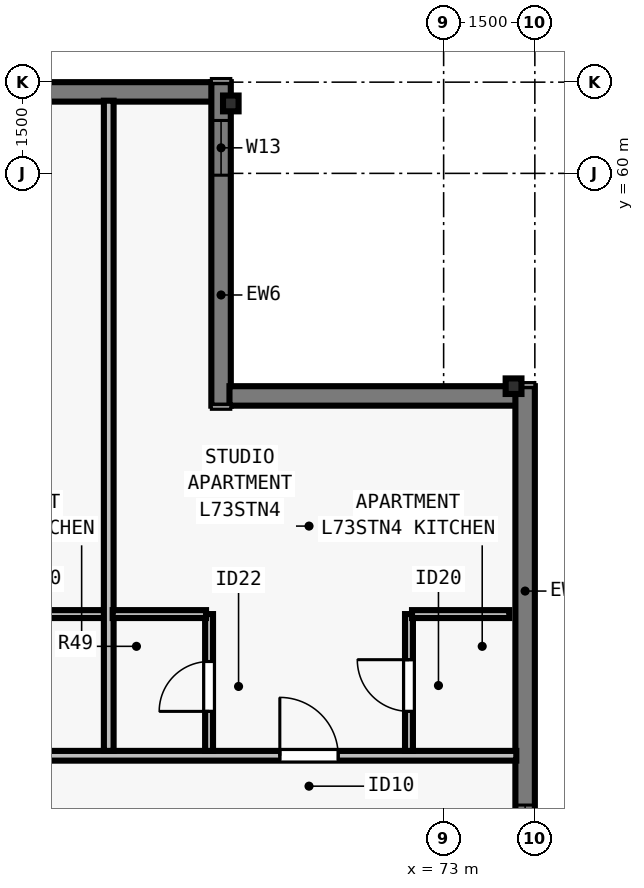
"""IFC4 building model, lengths in metres.
Left out: names, types, materials, properties, quantities, classifications, styles, units other than length and angle.
Written with IfcOpenShell. Run it as: python <this file> out.ifc"""

import sys

from ifc_helpers import new_model, si_unit, direction, frame, frame_2d, origin, origin_2d, place, context, subcontext, project, spatial, rectangle, i_section, extrude, element, fill, save


model = new_model("IFC4")
c1 = context("Model", 3, precision=1e-05, world=origin(), true_north=direction((0.0, 1.0)))
c2 = subcontext(c1, "Body", "Model", "MODEL_VIEW")
j1 = project(units=[si_unit("LENGTHUNIT", "METRE"), si_unit("PLANEANGLEUNIT", "RADIAN")], contexts=[c1])
p1 = place(None, origin())
s1 = spatial("IfcSite", under=j1, at=p1, CompositionType="ELEMENT")
p2 = place(p1, origin())
s2 = spatial("IfcBuilding", under=s1, at=p2, CompositionType="ELEMENT")
p3 = place(p2, frame((0.0, 0.0, 265.5)))
s3 = spatial("IfcBuildingStorey", under=s2, at=p3, CompositionType="ELEMENT", Elevation=265.5)
for number, where, z_axis, x_axis in (
    (1, (74.15, 56.5, 0.0), (0.0, 0.0, 1.0), (0.0, 1.0, 0.0)),
    (2, (69.5, 61.15, 0.0), (0.0, 0.0, 1.0), (1.0, 0.0, 0.0)),
):
    element("IfcColumn", number, at=place(p3, frame(where, z_axis=z_axis, x_axis=x_axis)), inside=s3, PredefinedType="COLUMN", context=c2, shape_type="SweptSolid", body=[
        extrude(i_section(OverallWidth=0.256, OverallDepth=0.26, WebThickness=0.01, FlangeThickness=0.017, FilletRadius=0.013, at=origin_2d()), origin(), (0.0, 0.0, 1.0), 3.5),
    ])
p4 = place(p3, frame((34.5, 61.34, 0.0), z_axis=(0.0, 0.0, 1.0), x_axis=(1.0, 0.0, 0.0)))
e3 = element("IfcWall", 3, at=p4, inside=s3, PredefinedType="SOLIDWALL", context=c2, shape_type="SweptSolid", body=[
    extrude(rectangle(XDim=34.702, YDim=0.32, at=frame_2d((17.351, 0.0))), origin(), (0.0, 0.0, 1.0), 3.29),
])
p5 = place(p4, frame((4.613, 0.0, 0.8)))
e4 = element("IfcOpeningElement", 4, at=p5, cuts=e3, PredefinedType="OPENING", context=c2, shape_type="SweptSolid", body=[
    extrude(rectangle(XDim=1.85, YDim=1.678, at=frame_2d((0.925, 0.839))), frame((0.0, 0.17, 0.0), z_axis=(0.0, -1.0, 0.0), x_axis=(1.0, 0.0, 0.0)), (0.0, 0.0, 1.0), 0.34),
])
p6 = place(p4, frame((8.138, 0.0, 0.8)))
e5 = element("IfcOpeningElement", 5, at=p6, cuts=e3, PredefinedType="OPENING", context=c2, shape_type="SweptSolid", body=[
    extrude(rectangle(XDim=1.55, YDim=1.678, at=frame_2d((0.775, 0.839))), frame((0.0, 0.17, 0.0), z_axis=(0.0, -1.0, 0.0), x_axis=(1.0, 0.0, 0.0)), (0.0, 0.0, 1.0), 0.34),
])
p7 = place(p4, frame((14.888, 0.0, 0.8)))
e6 = element("IfcOpeningElement", 6, at=p7, cuts=e3, PredefinedType="OPENING", context=c2, shape_type="SweptSolid", body=[
    extrude(rectangle(XDim=1.55, YDim=1.678, at=frame_2d((0.775, 0.839))), frame((0.0, 0.17, 0.0), z_axis=(0.0, -1.0, 0.0), x_axis=(1.0, 0.0, 0.0)), (0.0, 0.0, 1.0), 0.34),
])
p8 = place(p4, frame((19.364, 0.0, 0.8)))
e7 = element("IfcOpeningElement", 7, at=p8, cuts=e3, PredefinedType="OPENING", context=c2, shape_type="SweptSolid", body=[
    extrude(rectangle(XDim=1.85, YDim=1.678, at=frame_2d((0.925, 0.839))), frame((0.0, 0.17, 0.0), z_axis=(0.0, -1.0, 0.0), x_axis=(1.0, 0.0, 0.0)), (0.0, 0.0, 1.0), 0.34),
])
p9 = place(p4, frame((25.314, 0.0, 0.8)))
e8 = element("IfcOpeningElement", 8, at=p9, cuts=e3, PredefinedType="OPENING", context=c2, shape_type="SweptSolid", body=[
    extrude(rectangle(XDim=1.85, YDim=1.678, at=frame_2d((0.925, 0.839))), frame((0.0, 0.17, 0.0), z_axis=(0.0, -1.0, 0.0), x_axis=(1.0, 0.0, 0.0)), (0.0, 0.0, 1.0), 0.34),
])
p10 = place(p4, frame((28.389, 0.0, 0.8)))
e9 = element("IfcOpeningElement", 9, at=p10, cuts=e3, PredefinedType="OPENING", context=c2, shape_type="SweptSolid", body=[
    extrude(rectangle(XDim=1.55, YDim=1.678, at=frame_2d((0.775, 0.839))), frame((0.0, 0.17, 0.0), z_axis=(0.0, -1.0, 0.0), x_axis=(1.0, 0.0, 0.0)), (0.0, 0.0, 1.0), 0.34),
])
p11 = place(p3, frame((69.34, 61.5, 0.0), z_axis=(0.0, 0.0, 1.0), x_axis=(0.0, -1.0, 0.0)))
e10 = element("IfcWall", 10, at=p11, inside=s3, PredefinedType="SOLIDWALL", context=c2, shape_type="SweptSolid", body=[
    extrude(rectangle(XDim=5.32, YDim=0.32, at=frame_2d((2.66, 0.0))), origin(), (0.0, 0.0, 1.0), 3.29),
])
p12 = place(p11, frame((0.63, 0.0, 0.8)))
e11 = element("IfcOpeningElement", 11, at=p12, cuts=e10, PredefinedType="OPENING", context=c2, shape_type="SweptSolid", body=[
    extrude(rectangle(XDim=0.9, YDim=1.678, at=frame_2d((0.45, 0.839))), frame((0.0, 0.17, 0.0), z_axis=(0.0, -1.0, 0.0), x_axis=(1.0, 0.0, 0.0)), (0.0, 0.0, 1.0), 0.34),
])
p13 = place(p3, frame((69.478, 56.34, 0.0), z_axis=(0.0, 0.0, 1.0), x_axis=(1.0, 0.0, 0.0)))
e12 = element("IfcWall", 12, at=p13, inside=s3, PredefinedType="SOLIDWALL", context=c2, shape_type="SweptSolid", body=[
    extrude(rectangle(XDim=4.724, YDim=0.32, at=frame_2d((2.362, 0.0))), origin(), (0.0, 0.0, 1.0), 3.29),
])
p14 = place(p3, frame((74.34, 56.5, 0.0), z_axis=(0.0, 0.0, 1.0), x_axis=(0.0, -1.0, 0.0)))
e13 = element("IfcWall", 13, at=p14, inside=s3, PredefinedType="SOLIDWALL", context=c2, shape_type="SweptSolid", body=[
    extrude(rectangle(XDim=34.702, YDim=0.32, at=frame_2d((17.351, 0.0))), origin(), (0.0, 0.0, 1.0), 3.29),
])
p15 = place(p14, frame((6.888, 0.0, 0.8)))
e14 = element("IfcOpeningElement", 14, at=p15, cuts=e13, PredefinedType="OPENING", context=c2, shape_type="SweptSolid", body=[
    extrude(rectangle(XDim=1.55, YDim=1.678, at=frame_2d((0.775, 0.839))), frame((0.0, 0.17, 0.0), z_axis=(0.0, -1.0, 0.0), x_axis=(1.0, 0.0, 0.0)), (0.0, 0.0, 1.0), 0.34),
])
p16 = place(p14, frame((10.113, 0.0, 0.8)))
e15 = element("IfcOpeningElement", 15, at=p16, cuts=e13, PredefinedType="OPENING", context=c2, shape_type="SweptSolid", body=[
    extrude(rectangle(XDim=1.85, YDim=1.678, at=frame_2d((0.925, 0.839))), frame((0.0, 0.17, 0.0), z_axis=(0.0, -1.0, 0.0), x_axis=(1.0, 0.0, 0.0)), (0.0, 0.0, 1.0), 0.34),
])
p17 = place(p14, frame((14.038, 0.0, 0.8)))
e16 = element("IfcOpeningElement", 16, at=p17, cuts=e13, PredefinedType="OPENING", context=c2, shape_type="SweptSolid", body=[
    extrude(rectangle(XDim=1.55, YDim=1.678, at=frame_2d((0.775, 0.839))), frame((0.0, 0.17, 0.0), z_axis=(0.0, -1.0, 0.0), x_axis=(1.0, 0.0, 0.0)), (0.0, 0.0, 1.0), 0.34),
])
p18 = place(p14, frame((18.114, 0.0, 0.8)))
e17 = element("IfcOpeningElement", 17, at=p18, cuts=e13, PredefinedType="OPENING", context=c2, shape_type="SweptSolid", body=[
    extrude(rectangle(XDim=1.85, YDim=1.678, at=frame_2d((0.925, 0.839))), frame((0.0, 0.17, 0.0), z_axis=(0.0, -1.0, 0.0), x_axis=(1.0, 0.0, 0.0)), (0.0, 0.0, 1.0), 0.34),
])
p19 = place(p14, frame((23.614, 0.0, 0.8)))
e18 = element("IfcOpeningElement", 18, at=p19, cuts=e13, PredefinedType="OPENING", context=c2, shape_type="SweptSolid", body=[
    extrude(rectangle(XDim=1.85, YDim=1.678, at=frame_2d((0.925, 0.839))), frame((0.0, 0.17, 0.0), z_axis=(0.0, -1.0, 0.0), x_axis=(1.0, 0.0, 0.0)), (0.0, 0.0, 1.0), 0.34),
])
p20 = place(p14, frame((29.24, 0.0, 0.8)))
e19 = element("IfcOpeningElement", 19, at=p20, cuts=e13, PredefinedType="OPENING", context=c2, shape_type="SweptSolid", body=[
    extrude(rectangle(XDim=1.55, YDim=1.678, at=frame_2d((0.775, 0.839))), frame((0.0, 0.17, 0.0), z_axis=(0.0, -1.0, 0.0), x_axis=(1.0, 0.0, 0.0)), (0.0, 0.0, 1.0), 0.34),
])
p21 = place(p3, frame((29.805, 50.423, 0.0), z_axis=(0.0, 0.0, 1.0), x_axis=(1.0, 0.0, 0.0)))
e20 = element("IfcWall", 20, at=p21, inside=s3, PredefinedType="PARTITIONING", context=c2, shape_type="SweptSolid", body=[
    extrude(rectangle(XDim=44.39, YDim=0.16, at=frame_2d((22.195, 0.0))), origin(), (0.0, 0.0, 1.0), 2.958),
])
p22 = place(p21, frame((5.465, 0.0, 0.0)))
e21 = element("IfcOpeningElement", 21, at=p22, cuts=e20, PredefinedType="OPENING", context=c2, shape_type="SweptSolid", body=[
    extrude(rectangle(XDim=0.96, YDim=2.12, at=frame_2d((0.48, 1.06))), frame((0.0, 0.09, 0.0), z_axis=(0.0, -1.0, 0.0), x_axis=(1.0, 0.0, 0.0)), (0.0, 0.0, 1.0), 0.18),
])
p23 = place(p21, frame((19.179, 0.0, 0.0)))
e22 = element("IfcOpeningElement", 22, at=p23, cuts=e20, PredefinedType="OPENING", context=c2, shape_type="SweptSolid", body=[
    extrude(rectangle(XDim=0.96, YDim=2.18, at=frame_2d((0.48, 1.09))), frame((0.0, 0.09, 0.0), z_axis=(0.0, -1.0, 0.0), x_axis=(1.0, 0.0, 0.0)), (0.0, 0.0, 1.0), 0.18),
])
p24 = place(p21, frame((26.106, 0.0, 0.0)))
e23 = element("IfcOpeningElement", 23, at=p24, cuts=e20, PredefinedType="OPENING", context=c2, shape_type="SweptSolid", body=[
    extrude(rectangle(XDim=0.96, YDim=2.18, at=frame_2d((0.48, 1.09))), frame((0.0, 0.09, 0.0), z_axis=(0.0, -1.0, 0.0), x_axis=(1.0, 0.0, 0.0)), (0.0, 0.0, 1.0), 0.18),
])
p25 = place(p21, frame((33.214, 0.0, 0.0)))
e24 = element("IfcOpeningElement", 24, at=p25, cuts=e20, PredefinedType="OPENING", context=c2, shape_type="SweptSolid", body=[
    extrude(rectangle(XDim=0.96, YDim=2.18, at=frame_2d((0.48, 1.09))), frame((0.0, 0.09, 0.0), z_axis=(0.0, -1.0, 0.0), x_axis=(1.0, 0.0, 0.0)), (0.0, 0.0, 1.0), 0.18),
])
p26 = place(p21, frame((40.501, 0.0, 0.0)))
e25 = element("IfcOpeningElement", 25, at=p26, cuts=e20, PredefinedType="OPENING", context=c2, shape_type="SweptSolid", body=[
    extrude(rectangle(XDim=0.96, YDim=2.18, at=frame_2d((0.48, 1.09))), frame((0.0, 0.09, 0.0), z_axis=(0.0, -1.0, 0.0), x_axis=(1.0, 0.0, 0.0)), (0.0, 0.0, 1.0), 0.18),
])
p27 = place(p3, frame((65.893, 52.752, 0.0), z_axis=(0.0, 0.0, 1.0), x_axis=(1.0, 0.0, 0.0)))
e26 = element("IfcWall", 26, at=p27, inside=s3, PredefinedType="PLUMBINGWALL", context=c2, shape_type="SweptSolid", body=[
    extrude(rectangle(XDim=1.6, YDim=0.13, at=frame_2d((0.8, 0.0))), origin(), (0.0, 0.0, 1.0), 3.29),
])
p28 = place(p3, frame((67.492, 50.502, 0.0), z_axis=(0.0, 0.0, 1.0), x_axis=(0.0, 1.0, 0.0)))
e27 = element("IfcWall", 27, at=p28, inside=s3, PredefinedType="PARTITIONING", context=c2, shape_type="SweptSolid", body=[
    extrude(rectangle(XDim=10.693, YDim=0.16, at=frame_2d((5.346, 0.0))), origin(), (0.0, 0.0, 1.0), 2.573),
])
p29 = place(p3, frame((69.143, 50.502, 0.0), z_axis=(0.0, 0.0, 1.0), x_axis=(0.0, 1.0, 0.0)))
e28 = element("IfcWall", 28, at=p29, inside=s3, PredefinedType="PLUMBINGWALL", context=c2, shape_type="SweptSolid", body=[
    extrude(rectangle(XDim=2.25, YDim=0.13, at=frame_2d((1.125, 0.0))), origin(), (0.0, 0.0, 1.0), 3.29),
])
p30 = place(p29, frame((0.65, 0.0, 0.0)))
e29 = element("IfcOpeningElement", 29, at=p30, cuts=e28, PredefinedType="OPENING", context=c2, shape_type="SweptSolid", body=[
    extrude(rectangle(XDim=0.82, YDim=2.1, at=frame_2d((0.41, 1.05))), frame((0.0, 0.075, 0.0), z_axis=(0.0, -1.0, 0.0), x_axis=(1.0, 0.0, 0.0)), (0.0, 0.0, 1.0), 0.15),
])
p31 = place(p3, frame((67.558, 52.752, 0.0), z_axis=(0.0, 0.0, 1.0), x_axis=(1.0, 0.0, 0.0)))
e30 = element("IfcWall", 30, at=p31, inside=s3, PredefinedType="PLUMBINGWALL", context=c2, shape_type="SweptSolid", body=[
    extrude(rectangle(XDim=1.535, YDim=0.13, at=frame_2d((0.768, 0.0))), origin(), (0.0, 0.0, 1.0), 2.958),
])
p32 = place(p3, frame((72.43, 50.502, 0.0), z_axis=(0.0, 0.0, 1.0), x_axis=(0.0, 1.0, 0.0)))
e31 = element("IfcWall", 31, at=p32, inside=s3, PredefinedType="PLUMBINGWALL", context=c2, shape_type="SweptSolid", body=[
    extrude(rectangle(XDim=2.25, YDim=0.13, at=frame_2d((1.125, 0.0))), origin(), (0.0, 0.0, 1.0), 3.29),
])
p33 = place(p32, frame((0.65, 0.0, 0.0)))
e32 = element("IfcOpeningElement", 32, at=p33, cuts=e31, PredefinedType="OPENING", context=c2, shape_type="SweptSolid", body=[
    extrude(rectangle(XDim=0.85, YDim=2.1, at=frame_2d((0.425, 1.05))), frame((0.0, 0.075, 0.0), z_axis=(0.0, -1.0, 0.0), x_axis=(1.0, 0.0, 0.0)), (0.0, 0.0, 1.0), 0.15),
])
p34 = place(p3, frame((72.48, 52.752, 0.0), z_axis=(0.0, 0.0, 1.0), x_axis=(1.0, 0.0, 0.0)))
e33 = element("IfcWall", 33, at=p34, inside=s3, PredefinedType="PLUMBINGWALL", context=c2, shape_type="SweptSolid", body=[
    extrude(rectangle(XDim=1.6, YDim=0.13, at=frame_2d((0.8, 0.0))), origin(), (0.0, 0.0, 1.0), 3.29),
])
p35 = place(p15, origin())
e34 = element("IfcWindow", 34, at=p35, inside=s3, PartitioningType="SINGLE_PANEL", PredefinedType="WINDOW", context=c2, shape_type="SweptSolid", body=[
    extrude(rectangle(XDim=1.55, YDim=1.678, at=frame_2d((0.775, 0.839))), frame((0.0, -0.05, 0.0), z_axis=(0.0, -1.0, 0.0), x_axis=(1.0, 0.0, 0.0)), (0.0, 0.0, 1.0), 0.06),
])
fill(e14, e34)
p36 = place(p12, origin())
e35 = element("IfcWindow", 35, at=p36, inside=s3, PartitioningType="SINGLE_PANEL", PredefinedType="WINDOW", context=c2, shape_type="SweptSolid", body=[
    extrude(rectangle(XDim=0.9, YDim=1.678, at=frame_2d((0.45, 0.839))), frame((0.0, -0.04, 0.0), z_axis=(0.0, -1.0, 0.0), x_axis=(1.0, 0.0, 0.0)), (0.0, 0.0, 1.0), 0.06),
])
fill(e11, e35)
p37 = place(p30, origin())
e36 = element("IfcDoor", 36, at=p37, inside=s3, OperationType="SINGLE_SWING_LEFT", PredefinedType="DOOR", context=c2, shape_type="SweptSolid", body=[
    extrude(rectangle(XDim=0.82, YDim=2.1, at=frame_2d((0.41, 1.05))), frame((0.0, 0.025, 0.0), z_axis=(0.0, -1.0, 0.0), x_axis=(1.0, 0.0, 0.0)), (0.0, 0.0, 1.0), 0.05),
])
fill(e29, e36)
p38 = place(p33, origin())
e37 = element("IfcDoor", 37, at=p38, inside=s3, OperationType="SINGLE_SWING_RIGHT", PredefinedType="DOOR", context=c2, shape_type="SweptSolid", body=[
    extrude(rectangle(XDim=0.85, YDim=2.1, at=frame_2d((0.425, 1.05))), frame((0.0, 0.025, 0.0), z_axis=(0.0, -1.0, 0.0), x_axis=(1.0, 0.0, 0.0)), (0.0, 0.0, 1.0), 0.05),
])
fill(e32, e37)
p39 = place(p26, origin())
e38 = element("IfcDoor", 38, at=p39, inside=s3, OperationType="SINGLE_SWING_LEFT", PredefinedType="DOOR", context=c2, shape_type="SweptSolid", body=[
    extrude(rectangle(XDim=0.96, YDim=2.18, at=frame_2d((0.48, 1.09))), frame((0.0, 0.025, 0.0), z_axis=(0.0, -1.0, 0.0), x_axis=(1.0, 0.0, 0.0)), (0.0, 0.0, 1.0), 0.05),
])
fill(e25, e38)
save(model, sys.argv[1])
